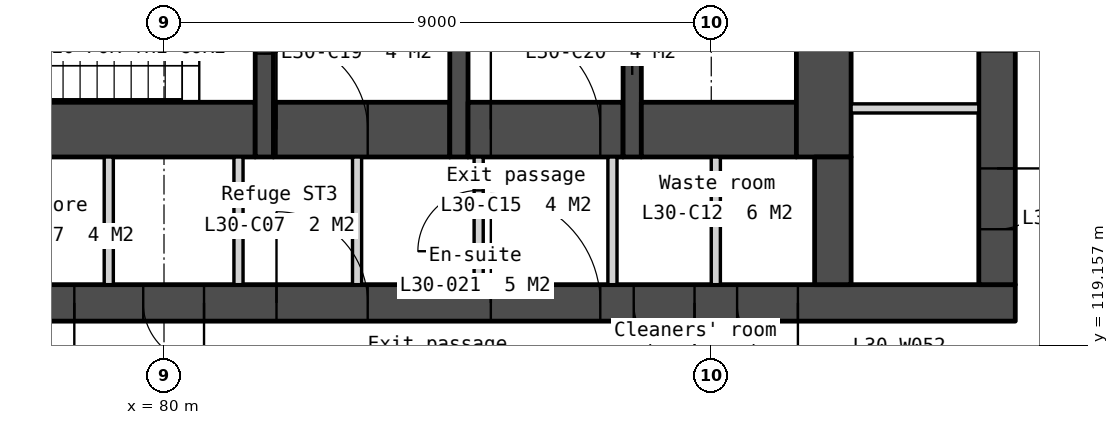
"""IFC4 building model, lengths in metres.
Left out: names, types, materials, properties, quantities, classifications, styles, units other than length and angle.
Written with IfcOpenShell. Run it as: python <this file> out.ifc"""

import sys

from ifc_helpers import new_model, si_unit, direction, frame, frame_2d, origin, place, context, subcontext, project, spatial, polyline, rectangle, outline, extrude, element, fill, save


model = new_model("IFC4")
c1 = context("Model", 3, precision=1e-05, world=origin(), true_north=direction((0.0, 1.0)))
c2 = subcontext(c1, "Body", "Model", "MODEL_VIEW")
j1 = project(units=[si_unit("LENGTHUNIT", "METRE"), si_unit("PLANEANGLEUNIT", "RADIAN")], contexts=[c1])
p1 = place(None, origin())
s1 = spatial("IfcSite", under=j1, at=p1, CompositionType="ELEMENT")
p2 = place(p1, origin())
s2 = spatial("IfcBuilding", under=s1, at=p2, CompositionType="ELEMENT")
p3 = place(p2, frame((0.0, 0.0, 120.3)))
s3 = spatial("IfcBuildingStorey", under=s2, at=p3, CompositionType="ELEMENT", Elevation=120.3)
p4 = place(p3, frame((66.0, 119.85, 0.0), z_axis=(0.0, 0.0, 1.0), x_axis=(1.0, 0.0, 0.0)))
e1 = element("IfcWall", 1, at=p4, inside=s3, PredefinedType="SOLIDWALL", context=c2, shape_type="SweptSolid", body=[
    extrude(rectangle(XDim=28.0, YDim=0.6, at=frame_2d((14.0, 0.0))), origin(), (0.0, 0.0, 1.0), 3.25),
])
p5 = place(p4, frame((6.825, 0.0, 0.0)))
e2 = element("IfcOpeningElement", 2, at=p5, cuts=e1, PredefinedType="OPENING", context=c2, shape_type="SweptSolid", body=[
    extrude(rectangle(XDim=1.8, YDim=2.1, at=frame_2d((0.9, 1.05))), frame((0.0, 0.31, 0.0), z_axis=(0.0, -1.0, 0.0), x_axis=(1.0, 0.0, 0.0)), (0.0, 0.0, 1.0), 0.62),
])
p6 = place(p4, frame((15.85, 0.0, 0.0)))
e3 = element("IfcOpeningElement", 3, at=p6, cuts=e1, PredefinedType="OPENING", context=c2, shape_type="SweptSolid", body=[
    extrude(rectangle(XDim=1.5, YDim=2.1, at=frame_2d((0.75, 1.05))), frame((0.0, 0.31, 0.0), z_axis=(0.0, -1.0, 0.0), x_axis=(1.0, 0.0, 0.0)), (0.0, 0.0, 1.0), 0.62),
])
p7 = place(p4, frame((19.375, 0.0, 0.0)))
e4 = element("IfcOpeningElement", 4, at=p7, cuts=e1, PredefinedType="OPENING", context=c2, shape_type="SweptSolid", body=[
    extrude(rectangle(XDim=1.8, YDim=2.1, at=frame_2d((0.9, 1.05))), frame((0.0, 0.31, 0.0), z_axis=(0.0, -1.0, 0.0), x_axis=(1.0, 0.0, 0.0)), (0.0, 0.0, 1.0), 0.62),
])
p8 = place(p4, frame((4.425, 0.0, 0.0)))
e5 = element("IfcOpeningElement", 5, at=p8, cuts=e1, PredefinedType="OPENING", context=c2, shape_type="SweptSolid", body=[
    extrude(rectangle(XDim=1.0, YDim=2.1, at=frame_2d((0.5, 1.05))), frame((0.0, 0.31, 0.0), z_axis=(0.0, -1.0, 0.0), x_axis=(1.0, 0.0, 0.0)), (0.0, 0.0, 1.0), 0.62),
])
p9 = place(p4, frame((9.783, 0.0, 0.0)))
e6 = element("IfcOpeningElement", 6, at=p9, cuts=e1, PredefinedType="OPENING", context=c2, shape_type="SweptSolid", body=[
    extrude(rectangle(XDim=1.0, YDim=2.1, at=frame_2d((0.5, 1.05))), frame((0.0, 0.31, 0.0), z_axis=(0.0, -1.0, 0.0), x_axis=(1.0, 0.0, 0.0)), (0.0, 0.0, 1.0), 0.62),
])
p10 = place(p4, frame((11.525, 0.0, 0.0)))
e7 = element("IfcOpeningElement", 7, at=p10, cuts=e1, PredefinedType="OPENING", context=c2, shape_type="SweptSolid", body=[
    extrude(rectangle(XDim=1.0, YDim=2.1, at=frame_2d((0.5, 1.05))), frame((0.0, 0.31, 0.0), z_axis=(0.0, -1.0, 0.0), x_axis=(1.0, 0.0, 0.0)), (0.0, 0.0, 1.0), 0.62),
])
p11 = place(p4, frame((13.658, 0.0, 0.0)))
e8 = element("IfcOpeningElement", 8, at=p11, cuts=e1, PredefinedType="OPENING", context=c2, shape_type="SweptSolid", body=[
    extrude(rectangle(XDim=1.0, YDim=2.1, at=frame_2d((0.5, 1.05))), frame((0.0, 0.31, 0.0), z_axis=(0.0, -1.0, 0.0), x_axis=(1.0, 0.0, 0.0)), (0.0, 0.0, 1.0), 0.62),
])
p12 = place(p4, frame((21.725, 0.0, 0.0)))
e9 = element("IfcOpeningElement", 9, at=p12, cuts=e1, PredefinedType="OPENING", context=c2, shape_type="SweptSolid", body=[
    extrude(rectangle(XDim=1.0, YDim=2.1, at=frame_2d((0.5, 1.05))), frame((0.0, 0.31, 0.0), z_axis=(0.0, -1.0, 0.0), x_axis=(1.0, 0.0, 0.0)), (0.0, 0.0, 1.0), 0.62),
])
p13 = place(p4, frame((23.425, 0.0, 0.0)))
e10 = element("IfcOpeningElement", 10, at=p13, cuts=e1, PredefinedType="OPENING", context=c2, shape_type="SweptSolid", body=[
    extrude(rectangle(XDim=1.0, YDim=2.1, at=frame_2d((0.5, 1.05))), frame((0.0, 0.31, 0.0), z_axis=(0.0, -1.0, 0.0), x_axis=(1.0, 0.0, 0.0)), (0.0, 0.0, 1.0), 0.62),
])
p14 = place(p3, frame((75.3, 122.7, 0.0), z_axis=(0.0, 0.0, 1.0), x_axis=(1.0, 0.0, 0.0)))
e11 = element("IfcWall", 11, at=p14, inside=s3, PredefinedType="SOLIDWALL", context=c2, shape_type="SweptSolid", body=[
    extrude(rectangle(XDim=6.2, YDim=0.9, at=frame_2d((3.1, 0.0))), origin(), (0.0, 0.0, 1.0), 3.25),
])
for number, where, z_axis, x_axis in (
    (12, (79.092, 122.25, 0.0), (0.0, 0.0, 1.0), (0.0, -1.0, 0.0)),
    (13, (81.225, 122.25, 0.0), (0.0, 0.0, 1.0), (0.0, -1.0, 0.0)),
):
    element("IfcWall", number, at=place(p3, frame(where, z_axis=z_axis, x_axis=x_axis)), inside=s3, PredefinedType="PARTITIONING", context=c2, shape_type="SweptSolid", body=[
        extrude(rectangle(XDim=2.1, YDim=0.15, at=frame_2d((1.05, 0.0))), origin(), (0.0, 0.0, 1.0), 3.25),
    ])
p15 = place(p3, frame((81.65, 125.7, 0.0), z_axis=(0.0, 0.0, 1.0), x_axis=(0.0, -1.0, 0.0)))
e14 = element("IfcWall", 14, at=p15, inside=s3, PredefinedType="SOLIDWALL", context=c2, shape_type="SweptSolid", body=[
    extrude(rectangle(XDim=3.45, YDim=0.3, at=frame_2d((1.725, 0.0))), origin(), (0.0, 0.0, 1.0), 3.25),
])
p16 = place(p15, frame((0.75, 0.0, 0.0)))
e15 = element("IfcOpeningElement", 15, at=p16, cuts=e14, PredefinedType="OPENING", context=c2, shape_type="SweptSolid", body=[
    extrude(rectangle(XDim=1.0, YDim=2.1, at=frame_2d((0.5, 1.05))), frame((0.0, 0.16, 0.0), z_axis=(0.0, -1.0, 0.0), x_axis=(1.0, 0.0, 0.0)), (0.0, 0.0, 1.0), 0.32),
])
p17 = place(p3, frame((81.8, 122.7, 0.0), z_axis=(0.0, 0.0, 1.0), x_axis=(1.0, 0.0, 0.0)))
e16 = element("IfcWall", 16, at=p17, inside=s3, PredefinedType="SOLIDWALL", context=c2, shape_type="SweptSolid", body=[
    extrude(rectangle(XDim=2.9, YDim=0.9, at=frame_2d((1.45, 0.0))), origin(), (0.0, 0.0, 1.0), 3.25),
])
p18 = place(p17, frame((0.05, 0.0, 0.0)))
e17 = element("IfcOpeningElement", 17, at=p18, cuts=e16, PredefinedType="OPENING", context=c2, shape_type="SweptSolid", body=[
    extrude(rectangle(XDim=1.5, YDim=2.1, at=frame_2d((0.75, 1.05))), frame((0.0, 0.46, 0.0), z_axis=(0.0, -1.0, 0.0), x_axis=(1.0, 0.0, 0.0)), (0.0, 0.0, 1.0), 0.92),
])
p19 = place(p3, frame((83.175, 122.25, 0.0), z_axis=(0.0, 0.0, 1.0), x_axis=(0.0, -1.0, 0.0)))
e18 = element("IfcWall", 18, at=p19, inside=s3, PredefinedType="PARTITIONING", context=c2, shape_type="SweptSolid", body=[
    extrude(rectangle(XDim=2.1, YDim=0.15, at=frame_2d((1.05, 0.0))), origin(), (0.0, 0.0, 1.0), 3.25),
])
p20 = place(p3, frame((84.85, 133.95, 0.0), z_axis=(0.0, 0.0, 1.0), x_axis=(0.0, -1.0, 0.0)))
e19 = element("IfcWall", 19, at=p20, inside=s3, PredefinedType="SOLIDWALL", context=c2, shape_type="SweptSolid", body=[
    extrude(rectangle(XDim=11.7, YDim=0.3, at=frame_2d((5.85, 0.0))), origin(), (0.0, 0.0, 1.0), 3.25),
])
p21 = place(p3, frame((85.0, 122.7, 0.0), z_axis=(0.0, 0.0, 1.0), x_axis=(1.0, 0.0, 0.0)))
e20 = element("IfcWall", 20, at=p21, inside=s3, PredefinedType="SOLIDWALL", context=c2, shape_type="SweptSolid", body=[
    extrude(rectangle(XDim=2.55, YDim=0.9, at=frame_2d((1.275, 0.0))), origin(), (0.0, 0.0, 1.0), 3.25),
])
p22 = place(p21, frame((0.375, 0.0, 0.0)))
e21 = element("IfcOpeningElement", 21, at=p22, cuts=e20, PredefinedType="OPENING", context=c2, shape_type="SweptSolid", body=[
    extrude(rectangle(XDim=1.8, YDim=2.1, at=frame_2d((0.9, 1.05))), frame((0.0, 0.46, 0.0), z_axis=(0.0, -1.0, 0.0), x_axis=(1.0, 0.0, 0.0)), (0.0, 0.0, 1.0), 0.92),
])
p23 = place(p3, frame((85.175, 122.25, 0.0), z_axis=(0.0, 0.0, 1.0), x_axis=(0.0, -1.0, 0.0)))
e22 = element("IfcWall", 22, at=p23, inside=s3, PredefinedType="PARTITIONING", context=c2, shape_type="SweptSolid", body=[
    extrude(rectangle(XDim=2.1, YDim=0.15, at=frame_2d((1.05, 0.0))), origin(), (0.0, 0.0, 1.0), 3.25),
])
p24 = place(p23, frame((0.55, 0.0, 0.0)))
e23 = element("IfcOpeningElement", 23, at=p24, cuts=e22, PredefinedType="OPENING", context=c2, shape_type="SweptSolid", body=[
    extrude(rectangle(XDim=1.0, YDim=2.1, at=frame_2d((0.5, 1.05))), frame((0.0, 0.085, 0.0), z_axis=(0.0, -1.0, 0.0), x_axis=(1.0, 0.0, 0.0)), (0.0, 0.0, 1.0), 0.17),
])
p25 = place(p3, frame((87.375, 122.25, 0.0), z_axis=(0.0, 0.0, 1.0), x_axis=(0.0, -1.0, 0.0)))
e24 = element("IfcWall", 24, at=p25, inside=s3, PredefinedType="PARTITIONING", context=c2, shape_type="SweptSolid", body=[
    extrude(rectangle(XDim=2.1, YDim=0.15, at=frame_2d((1.05, 0.0))), origin(), (0.0, 0.0, 1.0), 3.25),
])
p26 = place(p3, frame((87.7, 133.95, 0.0), z_axis=(0.0, 0.0, 1.0), x_axis=(0.0, -1.0, 0.0)))
e25 = element("IfcWall", 25, at=p26, inside=s3, PredefinedType="SOLIDWALL", context=c2, shape_type="SweptSolid", body=[
    extrude(rectangle(XDim=11.7, YDim=0.3, at=frame_2d((5.85, 0.0))), origin(), (0.0, 0.0, 1.0), 3.25),
])
p27 = place(p26, frame((6.95, 0.0, 0.0)))
e26 = element("IfcOpeningElement", 26, at=p27, cuts=e25, PredefinedType="OPENING", context=c2, shape_type="SweptSolid", body=[
    extrude(rectangle(XDim=1.1, YDim=2.1, at=frame_2d((0.55, 1.05))), frame((0.0, 0.16, 0.0), z_axis=(0.0, -1.0, 0.0), x_axis=(1.0, 0.0, 0.0)), (0.0, 0.0, 1.0), 0.32),
])
p28 = place(p26, frame((5.1, 0.0, 0.0)))
e27 = element("IfcOpeningElement", 27, at=p28, cuts=e25, PredefinedType="OPENING", context=c2, shape_type="SweptSolid", body=[
    extrude(rectangle(XDim=1.0, YDim=2.1, at=frame_2d((0.5, 1.05))), frame((0.0, 0.16, 0.0), z_axis=(0.0, -1.0, 0.0), x_axis=(1.0, 0.0, 0.0)), (0.0, 0.0, 1.0), 0.32),
])
p29 = place(p26, frame((9.25, 0.0, 0.0)))
e28 = element("IfcOpeningElement", 28, at=p29, cuts=e25, PredefinedType="OPENING", context=c2, shape_type="SweptSolid", body=[
    extrude(rectangle(XDim=1.1, YDim=2.1, at=frame_2d((0.55, 1.05))), frame((0.0, 0.16, 0.0), z_axis=(0.0, -1.0, 0.0), x_axis=(1.0, 0.0, 0.0)), (0.0, 0.0, 1.0), 0.32),
])
p30 = place(p3, frame((87.85, 122.7, 0.0), z_axis=(0.0, 0.0, 1.0), x_axis=(1.0, 0.0, 0.0)))
e29 = element("IfcWall", 29, at=p30, inside=s3, PredefinedType="SOLIDWALL", context=c2, shape_type="SweptSolid", body=[
    extrude(rectangle(XDim=2.55, YDim=0.9, at=frame_2d((1.275, 0.0))), origin(), (0.0, 0.0, 1.0), 3.25),
])
p31 = place(p3, frame((89.075, 122.25, 0.0), z_axis=(0.0, 0.0, 1.0), x_axis=(0.0, -1.0, 0.0)))
e30 = element("IfcWall", 30, at=p31, inside=s3, PredefinedType="PARTITIONING", context=c2, shape_type="SweptSolid", body=[
    extrude(rectangle(XDim=2.1, YDim=0.15, at=frame_2d((1.05, 0.0))), origin(), (0.0, 0.0, 1.0), 3.25),
])
p32 = place(p3, frame((90.85, 133.95, 0.0), z_axis=(0.0, 0.0, 1.0), x_axis=(0.0, -1.0, 0.0)))
e31 = element("IfcWall", 31, at=p32, inside=s3, PredefinedType="SOLIDWALL", context=c2, shape_type="SweptSolid", body=[
    extrude(rectangle(XDim=11.7, YDim=0.9, at=frame_2d((5.85, 0.0))), origin(), (0.0, 0.0, 1.0), 3.25),
])
p33 = place(p3, frame((91.0, 122.25, 0.0), z_axis=(0.0, 0.0, 1.0), x_axis=(0.0, -1.0, 0.0)))
e32 = element("IfcWall", 32, at=p33, inside=s3, PredefinedType="SOLIDWALL", context=c2, shape_type="SweptSolid", body=[
    extrude(rectangle(XDim=2.1, YDim=0.6, at=frame_2d((1.05, 0.0))), origin(), (0.0, 0.0, 1.0), 3.25),
])
p34 = place(p3, frame((91.3, 123.049, 0.0), z_axis=(0.0, 0.0, 1.0), x_axis=(1.0, 0.0, 0.0)))
e33 = element("IfcWall", 33, at=p34, inside=s3, PredefinedType="PARTITIONING", context=c2, shape_type="SweptSolid", body=[
    extrude(rectangle(XDim=2.1, YDim=0.15, at=frame_2d((1.05, 0.0))), origin(), (0.0, 0.0, 1.0), 3.25),
])
p35 = place(p3, frame((93.7, 133.95, 0.0), z_axis=(0.0, 0.0, 1.0), x_axis=(0.0, -1.0, 0.0)))
e34 = element("IfcWall", 34, at=p35, inside=s3, PredefinedType="SOLIDWALL", context=c2, shape_type="SweptSolid", body=[
    extrude(rectangle(XDim=13.8, YDim=0.6, at=frame_2d((6.9, 0.0))), origin(), (0.0, 0.0, 1.0), 3.25),
])
p36 = place(p35, frame((0.6, 0.0, 0.0)))
e35 = element("IfcOpeningElement", 35, at=p36, cuts=e34, PredefinedType="OPENING", context=c2, shape_type="SweptSolid", body=[
    extrude(rectangle(XDim=1.1, YDim=2.1, at=frame_2d((0.55, 1.05))), frame((0.0, 0.31, 0.0), z_axis=(0.0, -1.0, 0.0), x_axis=(1.0, 0.0, 0.0)), (0.0, 0.0, 1.0), 0.62),
])
p37 = place(p35, frame((8.963, 0.0, 0.0)))
e36 = element("IfcOpeningElement", 36, at=p37, cuts=e34, PredefinedType="OPENING", context=c2, shape_type="SweptSolid", body=[
    extrude(rectangle(XDim=1.0, YDim=2.1, at=frame_2d((0.5, 1.05))), frame((0.0, 0.31, 0.0), z_axis=(0.0, -1.0, 0.0), x_axis=(1.0, 0.0, 0.0)), (0.0, 0.0, 1.0), 0.62),
])
p38 = place(p35, frame((11.888, 0.0, 0.0)))
e37 = element("IfcOpeningElement", 37, at=p38, cuts=e34, PredefinedType="OPENING", context=c2, shape_type="SweptSolid", body=[
    extrude(rectangle(XDim=1.0, YDim=2.1, at=frame_2d((0.5, 1.05))), frame((0.0, 0.31, 0.0), z_axis=(0.0, -1.0, 0.0), x_axis=(1.0, 0.0, 0.0)), (0.0, 0.0, 1.0), 0.62),
])
p39 = place(p3, frame((82.605, 93.333, -0.15), z_axis=(0.0, 0.0, 1.0), x_axis=(0.500000478905, 0.866025127289, 0.0)))
e38 = element("IfcWall", 38, at=p39, inside=s3, PredefinedType="SOLIDWALL", context=c2, shape_type="SweptSolid", body=[
    extrude(outline(polyline([(42.643, 0.0), (42.643, 3.4), (0.0, 3.4), (0.0, 0.0), (42.643, 0.0)])), frame((0.0, 0.225, 0.0), z_axis=(0.0, -1.0, 0.0), x_axis=(1.0, 0.0, 0.0)), (0.0, 0.0, 1.0), 0.45),
])
p40 = place(p39, frame((2.814, 0.0, 1.05)))
e39 = element("IfcOpeningElement", 39, at=p40, cuts=e38, PredefinedType="OPENING", context=c2, shape_type="SweptSolid", body=[
    extrude(rectangle(XDim=1.2, YDim=1.5, at=frame_2d((0.6, 0.75))), frame((0.0, 0.235, 0.0), z_axis=(0.0, -1.0, 0.0), x_axis=(1.0, 0.0, 0.0)), (0.0, 0.0, 1.0), 0.47),
])
p41 = place(p39, frame((4.514, 0.0, 1.05)))
e40 = element("IfcOpeningElement", 40, at=p41, cuts=e38, PredefinedType="OPENING", context=c2, shape_type="SweptSolid", body=[
    extrude(rectangle(XDim=1.2, YDim=1.5, at=frame_2d((0.6, 0.75))), frame((0.0, 0.235, 0.0), z_axis=(0.0, -1.0, 0.0), x_axis=(1.0, 0.0, 0.0)), (0.0, 0.0, 1.0), 0.47),
])
p42 = place(p39, frame((11.343, 0.0, 1.05)))
e41 = element("IfcOpeningElement", 41, at=p42, cuts=e38, PredefinedType="OPENING", context=c2, shape_type="SweptSolid", body=[
    extrude(rectangle(XDim=1.2, YDim=1.5, at=frame_2d((0.6, 0.75))), frame((0.0, 0.235, 0.0), z_axis=(0.0, -1.0, 0.0), x_axis=(1.0, 0.0, 0.0)), (0.0, 0.0, 1.0), 0.47),
])
p43 = place(p39, frame((13.043, 0.0, 1.05)))
e42 = element("IfcOpeningElement", 42, at=p43, cuts=e38, PredefinedType="OPENING", context=c2, shape_type="SweptSolid", body=[
    extrude(rectangle(XDim=1.2, YDim=1.5, at=frame_2d((0.6, 0.75))), frame((0.0, 0.235, 0.0), z_axis=(0.0, -1.0, 0.0), x_axis=(1.0, 0.0, 0.0)), (0.0, 0.0, 1.0), 0.47),
])
p44 = place(p39, frame((19.872, 0.0, 1.05)))
e43 = element("IfcOpeningElement", 43, at=p44, cuts=e38, PredefinedType="OPENING", context=c2, shape_type="SweptSolid", body=[
    extrude(rectangle(XDim=1.2, YDim=1.5, at=frame_2d((0.6, 0.75))), frame((0.0, 0.235, 0.0), z_axis=(0.0, -1.0, 0.0), x_axis=(1.0, 0.0, 0.0)), (0.0, 0.0, 1.0), 0.47),
])
p45 = place(p39, frame((21.572, 0.0, 1.05)))
e44 = element("IfcOpeningElement", 44, at=p45, cuts=e38, PredefinedType="OPENING", context=c2, shape_type="SweptSolid", body=[
    extrude(rectangle(XDim=1.2, YDim=1.5, at=frame_2d((0.6, 0.75))), frame((0.0, 0.235, 0.0), z_axis=(0.0, -1.0, 0.0), x_axis=(1.0, 0.0, 0.0)), (0.0, 0.0, 1.0), 0.47),
])
p46 = place(p39, frame((28.4, 0.0, 1.05)))
e45 = element("IfcOpeningElement", 45, at=p46, cuts=e38, PredefinedType="OPENING", context=c2, shape_type="SweptSolid", body=[
    extrude(rectangle(XDim=1.2, YDim=1.5, at=frame_2d((0.6, 0.75))), frame((0.0, 0.235, 0.0), z_axis=(0.0, -1.0, 0.0), x_axis=(1.0, 0.0, 0.0)), (0.0, 0.0, 1.0), 0.47),
])
p47 = place(p39, frame((30.1, 0.0, 1.05)))
e46 = element("IfcOpeningElement", 46, at=p47, cuts=e38, PredefinedType="OPENING", context=c2, shape_type="SweptSolid", body=[
    extrude(rectangle(XDim=1.2, YDim=1.5, at=frame_2d((0.6, 0.75))), frame((0.0, 0.235, 0.0), z_axis=(0.0, -1.0, 0.0), x_axis=(1.0, 0.0, 0.0)), (0.0, 0.0, 1.0), 0.47),
])
p48 = place(p39, frame((36.929, 0.0, 1.05)))
e47 = element("IfcOpeningElement", 47, at=p48, cuts=e38, PredefinedType="OPENING", context=c2, shape_type="SweptSolid", body=[
    extrude(rectangle(XDim=1.2, YDim=1.5, at=frame_2d((0.6, 0.75))), frame((0.0, 0.235, 0.0), z_axis=(0.0, -1.0, 0.0), x_axis=(1.0, 0.0, 0.0)), (0.0, 0.0, 1.0), 0.47),
])
p49 = place(p39, frame((38.629, 0.0, 1.05)))
e48 = element("IfcOpeningElement", 48, at=p49, cuts=e38, PredefinedType="OPENING", context=c2, shape_type="SweptSolid", body=[
    extrude(rectangle(XDim=1.2, YDim=1.5, at=frame_2d((0.6, 0.75))), frame((0.0, 0.235, 0.0), z_axis=(0.0, -1.0, 0.0), x_axis=(1.0, 0.0, 0.0)), (0.0, 0.0, 1.0), 0.47),
])
p50 = place(p38, origin())
e49 = element("IfcDoor", 49, at=p50, inside=s3, OperationType="SINGLE_SWING_LEFT", PredefinedType="DOOR", context=c2, shape_type="SweptSolid", body=[
    extrude(rectangle(XDim=1.0, YDim=2.1, at=frame_2d((0.5, 1.05))), frame((0.0, 0.025, 0.0), z_axis=(0.0, -1.0, 0.0), x_axis=(1.0, 0.0, 0.0)), (0.0, 0.0, 1.0), 0.05),
])
fill(e37, e49)
p51 = place(p22, origin())
e50 = element("IfcDoor", 50, at=p51, inside=s3, OperationType="DOUBLE_DOOR_DOUBLE_SWING", PredefinedType="DOOR", context=c2, shape_type="SweptSolid", body=[
    extrude(rectangle(XDim=1.8, YDim=2.1, at=frame_2d((0.9, 1.05))), frame((0.0, 0.025, 0.0), z_axis=(0.0, -1.0, 0.0), x_axis=(1.0, 0.0, 0.0)), (0.0, 0.0, 1.0), 0.05),
])
fill(e21, e50)
p52 = place(p18, origin())
e51 = element("IfcDoor", 51, at=p52, inside=s3, OperationType="DOUBLE_DOOR_DOUBLE_SWING", PredefinedType="DOOR", context=c2, shape_type="SweptSolid", body=[
    extrude(rectangle(XDim=1.5, YDim=2.1, at=frame_2d((0.75, 1.05))), frame((0.0, 0.025, 0.0), z_axis=(0.0, -1.0, 0.0), x_axis=(1.0, 0.0, 0.0)), (0.0, 0.0, 1.0), 0.05),
])
fill(e17, e51)
p53 = place(p6, origin())
e52 = element("IfcDoor", 52, at=p53, inside=s3, OperationType="DOUBLE_DOOR_DOUBLE_SWING", PredefinedType="DOOR", context=c2, shape_type="SweptSolid", body=[
    extrude(rectangle(XDim=1.5, YDim=2.1, at=frame_2d((0.75, 1.05))), frame((0.0, 0.025, 0.0), z_axis=(0.0, -1.0, 0.0), x_axis=(1.0, 0.0, 0.0)), (0.0, 0.0, 1.0), 0.05),
])
fill(e3, e52)
p54 = place(p7, origin())
e53 = element("IfcDoor", 53, at=p54, inside=s3, OperationType="DOUBLE_DOOR_DOUBLE_SWING", PredefinedType="DOOR", context=c2, shape_type="SweptSolid", body=[
    extrude(rectangle(XDim=1.8, YDim=2.1, at=frame_2d((0.9, 1.05))), frame((0.0, 0.025, 0.0), z_axis=(0.0, -1.0, 0.0), x_axis=(1.0, 0.0, 0.0)), (0.0, 0.0, 1.0), 0.05),
])
fill(e4, e53)
p55 = place(p10, origin())
e54 = element("IfcDoor", 54, at=p55, inside=s3, OperationType="SINGLE_SWING_RIGHT", PredefinedType="DOOR", context=c2, shape_type="SweptSolid", body=[
    extrude(rectangle(XDim=1.0, YDim=2.1, at=frame_2d((0.5, 1.05))), frame((0.0, 0.025, 0.0), z_axis=(0.0, -1.0, 0.0), x_axis=(1.0, 0.0, 0.0)), (0.0, 0.0, 1.0), 0.05),
])
fill(e7, e54)
p56 = place(p11, origin())
e55 = element("IfcDoor", 55, at=p56, inside=s3, OperationType="SINGLE_SWING_RIGHT", PredefinedType="DOOR", context=c2, shape_type="SweptSolid", body=[
    extrude(rectangle(XDim=1.0, YDim=2.1, at=frame_2d((0.5, 1.05))), frame((0.0, 0.025, 0.0), z_axis=(0.0, -1.0, 0.0), x_axis=(1.0, 0.0, 0.0)), (0.0, 0.0, 1.0), 0.05),
])
fill(e8, e55)
p57 = place(p24, origin())
e56 = element("IfcDoor", 56, at=p57, inside=s3, OperationType="SINGLE_SWING_RIGHT", PredefinedType="DOOR", context=c2, shape_type="SweptSolid", body=[
    extrude(rectangle(XDim=1.0, YDim=2.1, at=frame_2d((0.5, 1.05))), frame((0.0, 0.025, 0.0), z_axis=(0.0, -1.0, 0.0), x_axis=(1.0, 0.0, 0.0)), (0.0, 0.0, 1.0), 0.05),
])
fill(e23, e56)
p58 = place(p12, origin())
e57 = element("IfcDoor", 57, at=p58, inside=s3, OperationType="SINGLE_SWING_RIGHT", PredefinedType="DOOR", context=c2, shape_type="SweptSolid", body=[
    extrude(rectangle(XDim=1.0, YDim=2.1, at=frame_2d((0.5, 1.05))), frame((0.0, 0.025, 0.0), z_axis=(0.0, -1.0, 0.0), x_axis=(1.0, 0.0, 0.0)), (0.0, 0.0, 1.0), 0.05),
])
fill(e9, e57)
p59 = place(p13, origin())
e58 = element("IfcDoor", 58, at=p59, inside=s3, OperationType="SINGLE_SWING_RIGHT", PredefinedType="DOOR", context=c2, shape_type="SweptSolid", body=[
    extrude(rectangle(XDim=1.0, YDim=2.1, at=frame_2d((0.5, 1.05))), frame((0.0, 0.025, 0.0), z_axis=(0.0, -1.0, 0.0), x_axis=(1.0, 0.0, 0.0)), (0.0, 0.0, 1.0), 0.05),
])
fill(e10, e58)
p60 = place(p16, origin())
e59 = element("IfcDoor", 59, at=p60, inside=s3, OperationType="SINGLE_SWING_LEFT", PredefinedType="DOOR", context=c2, shape_type="SweptSolid", body=[
    extrude(rectangle(XDim=1.0, YDim=2.1, at=frame_2d((0.5, 1.05))), frame((0.0, 0.025, 0.0), z_axis=(0.0, -1.0, 0.0), x_axis=(1.0, 0.0, 0.0)), (0.0, 0.0, 1.0), 0.05),
])
fill(e15, e59)
p61 = place(p29, origin())
e60 = element("IfcDoor", 60, at=p61, inside=s3, OperationType="SLIDING_TO_LEFT", PredefinedType="DOOR", context=c2, shape_type="SweptSolid", body=[
    extrude(rectangle(XDim=1.1, YDim=2.1, at=frame_2d((0.55, 1.05))), frame((0.0, 0.025, 0.0), z_axis=(0.0, -1.0, 0.0), x_axis=(1.0, 0.0, 0.0)), (0.0, 0.0, 1.0), 0.05),
])
fill(e28, e60)
save(model, sys.argv[1])
